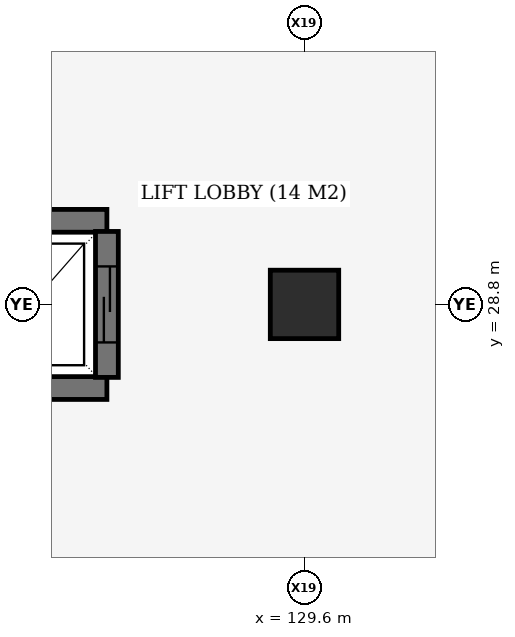
"""IFC4 building model, lengths in metres.
Left out: names, types, materials, properties, quantities, classifications, styles, units other than length and angle.
Written with IfcOpenShell. Run it as: python <this file> out.ifc"""

import sys

from ifc_helpers import new_model, si_unit, direction, frame, frame_2d, origin, origin_2d, place, context, subcontext, project, spatial, rectangle, extrude, element, fill, save


model = new_model("IFC4")
c1 = context("Model", 3, precision=1e-05, world=origin(), true_north=direction((0.0, 1.0)))
c2 = subcontext(c1, "Body", "Model", "MODEL_VIEW")
j1 = project(units=[si_unit("LENGTHUNIT", "METRE"), si_unit("PLANEANGLEUNIT", "RADIAN")], contexts=[c1])
p1 = place(None, origin())
s1 = spatial("IfcSite", under=j1, at=p1, CompositionType="ELEMENT")
p2 = place(p1, origin())
s2 = spatial("IfcBuilding", under=s1, at=p2, CompositionType="ELEMENT")
p3 = place(p2, origin())
s3 = spatial("IfcBuildingStorey", under=s2, at=p3, CompositionType="ELEMENT", Elevation=0.0)
p4 = place(p3, frame((129.6, 28.8, 0.0), z_axis=(0.0, 0.0, 1.0), x_axis=(1.0, 0.0, 0.0)))
e1 = element("IfcColumn", 1, at=p4, inside=s3, PredefinedType="COLUMN", context=c2, shape_type="SweptSolid", body=[
    extrude(rectangle(XDim=0.9, YDim=0.9, at=origin_2d()), origin(), (0.0, 0.0, 1.0), 5.1),
])
for number, where, z_axis, x_axis in (
    (2, (125.0, 27.7, 0.0), (0.0, 0.0, 1.0), (1.0, 0.0, 0.0)),
    (3, (127.0, 29.9, 0.0), (0.0, 0.0, 1.0), (-1.0, 0.0, 0.0)),
):
    element("IfcWall", number, at=place(p3, frame(where, z_axis=z_axis, x_axis=x_axis)), inside=s3, PredefinedType="SHEAR", context=c2, shape_type="SweptSolid", body=[
        extrude(rectangle(XDim=2.0, YDim=0.3, at=frame_2d((1.0, 0.0))), origin(), (0.0, 0.0, 1.0), 5.1),
    ])
p5 = place(p3, frame((127.0, 29.76, 0.0), z_axis=(0.0, 0.0, 1.0), x_axis=(0.0, -1.0, 0.0)))
e4 = element("IfcWall", 4, at=p5, inside=s3, PredefinedType="SHEAR", context=c2, shape_type="SweptSolid", body=[
    extrude(rectangle(XDim=1.92, YDim=0.3, at=frame_2d((0.96, 0.0))), origin(), (0.0, 0.0, 1.0), 5.1),
])
p6 = place(p5, frame((0.46, 0.0, 0.0)))
e5 = element("IfcOpeningElement", 5, at=p6, cuts=e4, PredefinedType="OPENING", context=c2, shape_type="SweptSolid", body=[
    extrude(rectangle(XDim=1.0, YDim=2.1, at=frame_2d((0.5, 1.05))), frame((0.0, 0.16, 0.0), z_axis=(0.0, -1.0, 0.0), x_axis=(1.0, 0.0, 0.0)), (0.0, 0.0, 1.0), 0.32),
])
p7 = place(p6, origin())
e6 = element("IfcDoor", 6, at=p7, inside=s3, OperationType="SLIDING_TO_LEFT", PredefinedType="DOOR", context=c2, shape_type="SweptSolid", body=[
    extrude(rectangle(XDim=1.0, YDim=2.1, at=frame_2d((0.5, 1.05))), frame((0.0, 0.025, 0.0), z_axis=(0.0, -1.0, 0.0), x_axis=(1.0, 0.0, 0.0)), (0.0, 0.0, 1.0), 0.05),
])
fill(e5, e6)
save(model, sys.argv[1])
